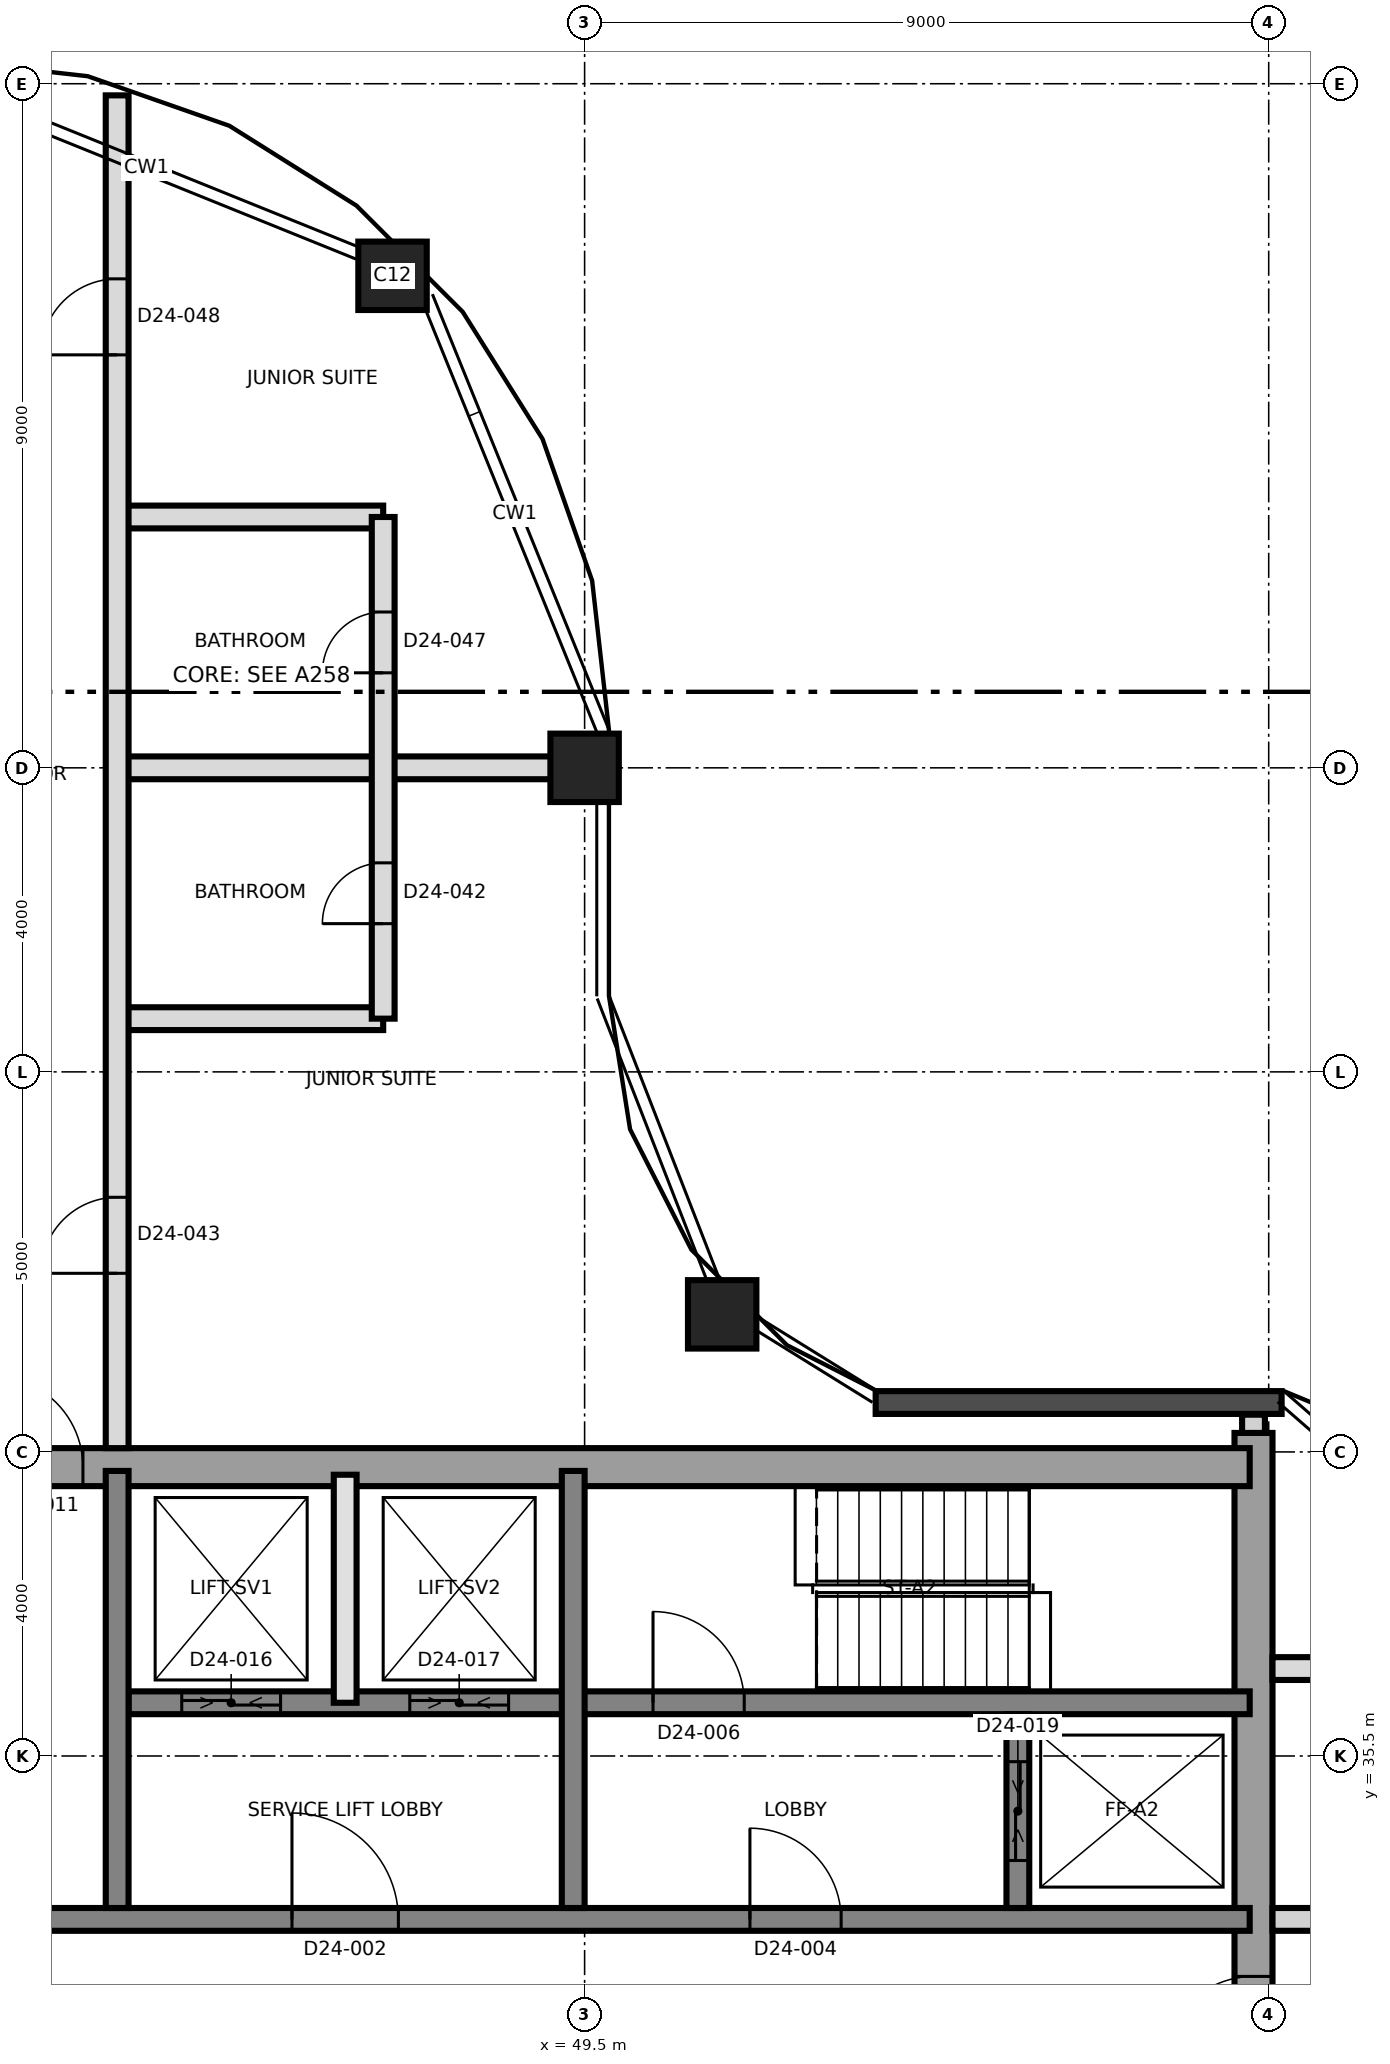
"""IFC4 building model, lengths in metres.
Left out: names, types, materials, properties, quantities, classifications, styles, units other than length and angle.
Written with IfcOpenShell. Run it as: python <this file> out.ifc"""

import sys

from ifc_helpers import new_model, si_unit, direction, frame, frame_2d, origin, origin_2d, place, context, subcontext, project, spatial, rectangle, extrude, element, fill, save


model = new_model("IFC4")
c1 = context("Model", 3, precision=1e-05, world=origin(), true_north=direction((0.0, 1.0)))
c2 = subcontext(c1, "Body", "Model", "MODEL_VIEW")
j1 = project(units=[si_unit("LENGTHUNIT", "METRE"), si_unit("PLANEANGLEUNIT", "RADIAN")], contexts=[c1])
p1 = place(None, origin())
s1 = spatial("IfcSite", under=j1, at=p1, CompositionType="ELEMENT")
p2 = place(p1, origin())
s2 = spatial("IfcBuilding", under=s1, at=p2, CompositionType="ELEMENT")
p3 = place(p2, frame((0.0, 0.0, 221.7)))
s3 = spatial("IfcBuildingStorey", under=s2, at=p3, CompositionType="ELEMENT", Elevation=221.7)
p4 = place(p3, frame((58.3, 21.25, 0.0), z_axis=(0.0, 0.0, 1.0), x_axis=(0.0, 1.0, 0.0)))
e1 = element("IfcWall", 1, at=p4, inside=s3, PredefinedType="SHEAR", context=c2, shape_type="SweptSolid", body=[
    extrude(rectangle(XDim=18.5, YDim=0.5, at=frame_2d((9.25, 0.0))), origin(), (0.0, 0.0, 1.0), 3.7),
])
p5 = place(p4, frame((10.15, 0.0, 0.0)))
e2 = element("IfcOpeningElement", 2, at=p5, cuts=e1, PredefinedType="OPENING", context=c2, shape_type="SweptSolid", body=[
    extrude(rectangle(XDim=1.2, YDim=2.1, at=frame_2d((0.6, 1.05))), frame((0.0, 0.26, 0.0), z_axis=(0.0, -1.0, 0.0), x_axis=(1.0, 0.0, 0.0)), (0.0, 0.0, 1.0), 0.52),
])
p6 = place(p3, frame((31.25, 39.3, 0.0), z_axis=(0.0, 0.0, 1.0), x_axis=(1.0, 0.0, 0.0)))
e3 = element("IfcWall", 3, at=p6, inside=s3, PredefinedType="SHEAR", context=c2, shape_type="SweptSolid", body=[
    extrude(rectangle(XDim=27.0, YDim=0.5, at=frame_2d((13.5, 0.0))), origin(), (0.0, 0.0, 1.0), 3.7),
])
p7 = place(p6, frame((10.45, 0.0, 0.0)))
e4 = element("IfcOpeningElement", 4, at=p7, cuts=e3, PredefinedType="OPENING", context=c2, shape_type="SweptSolid", body=[
    extrude(rectangle(XDim=1.2, YDim=2.1, at=frame_2d((0.6, 1.05))), frame((0.0, 0.26, 0.0), z_axis=(0.0, -1.0, 0.0), x_axis=(1.0, 0.0, 0.0)), (0.0, 0.0, 1.0), 0.52),
])
p8 = place(p3, frame((31.75, 33.35, 0.0), z_axis=(0.0, 0.0, 1.0), x_axis=(1.0, 0.0, 0.0)))
e5 = element("IfcWall", 5, at=p8, inside=s3, PredefinedType="SHEAR", context=c2, shape_type="SweptSolid", body=[
    extrude(rectangle(XDim=26.5, YDim=0.3, at=frame_2d((13.25, 0.0))), origin(), (0.0, 0.0, 1.0), 3.7),
])
p9 = place(p8, frame((13.9, 0.0, 0.0)))
e6 = element("IfcOpeningElement", 6, at=p9, cuts=e5, PredefinedType="OPENING", context=c2, shape_type="SweptSolid", body=[
    extrude(rectangle(XDim=1.4, YDim=2.1, at=frame_2d((0.7, 1.05))), frame((0.0, 0.16, 0.0), z_axis=(0.0, -1.0, 0.0), x_axis=(1.0, 0.0, 0.0)), (0.0, 0.0, 1.0), 0.32),
])
p10 = place(p8, frame((5.375, 0.0, 0.0)))
e7 = element("IfcOpeningElement", 7, at=p10, cuts=e5, PredefinedType="OPENING", context=c2, shape_type="SweptSolid", body=[
    extrude(rectangle(XDim=1.2, YDim=2.1, at=frame_2d((0.6, 1.05))), frame((0.0, 0.16, 0.0), z_axis=(0.0, -1.0, 0.0), x_axis=(1.0, 0.0, 0.0)), (0.0, 0.0, 1.0), 0.32),
])
p11 = place(p8, frame((19.925, 0.0, 0.0)))
e8 = element("IfcOpeningElement", 8, at=p11, cuts=e5, PredefinedType="OPENING", context=c2, shape_type="SweptSolid", body=[
    extrude(rectangle(XDim=1.2, YDim=2.1, at=frame_2d((0.6, 1.05))), frame((0.0, 0.16, 0.0), z_axis=(0.0, -1.0, 0.0), x_axis=(1.0, 0.0, 0.0)), (0.0, 0.0, 1.0), 0.32),
])
p12 = place(p3, frame((43.5, 36.2, 0.0), z_axis=(0.0, 0.0, 1.0), x_axis=(1.0, 0.0, 0.0)))
e9 = element("IfcWall", 9, at=p12, inside=s3, PredefinedType="SHEAR", context=c2, shape_type="SweptSolid", body=[
    extrude(rectangle(XDim=14.75, YDim=0.3, at=frame_2d((7.375, 0.0))), origin(), (0.0, 0.0, 1.0), 3.7),
])
p13 = place(p12, frame((6.9, 0.0, 0.0)))
e10 = element("IfcOpeningElement", 10, at=p13, cuts=e9, PredefinedType="OPENING", context=c2, shape_type="SweptSolid", body=[
    extrude(rectangle(XDim=1.2, YDim=2.1, at=frame_2d((0.6, 1.05))), frame((0.0, 0.16, 0.0), z_axis=(0.0, -1.0, 0.0), x_axis=(1.0, 0.0, 0.0)), (0.0, 0.0, 1.0), 0.32),
])
p14 = place(p12, frame((0.7, 0.0, 0.0)))
e11 = element("IfcOpeningElement", 11, at=p14, cuts=e9, PredefinedType="OPENING", context=c2, shape_type="SweptSolid", body=[
    extrude(rectangle(XDim=1.3, YDim=2.4, at=frame_2d((0.65, 1.2))), frame((0.0, 0.16, 0.0), z_axis=(0.0, -1.0, 0.0), x_axis=(1.0, 0.0, 0.0)), (0.0, 0.0, 1.0), 0.32),
])
p15 = place(p12, frame((3.7, 0.0, 0.0)))
e12 = element("IfcOpeningElement", 12, at=p15, cuts=e9, PredefinedType="OPENING", context=c2, shape_type="SweptSolid", body=[
    extrude(rectangle(XDim=1.3, YDim=2.4, at=frame_2d((0.65, 1.2))), frame((0.0, 0.16, 0.0), z_axis=(0.0, -1.0, 0.0), x_axis=(1.0, 0.0, 0.0)), (0.0, 0.0, 1.0), 0.32),
])
for number, where, z_axis, x_axis in (
    (13, (43.35, 33.5, 0.0), (0.0, 0.0, 1.0), (0.0, 1.0, 0.0)),
    (14, (49.35, 33.5, 0.0), (0.0, 0.0, 1.0), (0.0, 1.0, 0.0)),
):
    element("IfcWall", number, at=place(p3, frame(where, z_axis=z_axis, x_axis=x_axis)), inside=s3, PredefinedType="SHEAR", context=c2, shape_type="SweptSolid", body=[
        extrude(rectangle(XDim=5.75, YDim=0.3, at=frame_2d((2.875, 0.0))), origin(), (0.0, 0.0, 1.0), 3.7),
    ])
p16 = place(p3, frame((55.2, 33.5, 0.0), z_axis=(0.0, 0.0, 1.0), x_axis=(0.0, 1.0, 0.0)))
e15 = element("IfcWall", 15, at=p16, inside=s3, PredefinedType="SHEAR", context=c2, shape_type="SweptSolid", body=[
    extrude(rectangle(XDim=2.55, YDim=0.3, at=frame_2d((1.275, 0.0))), origin(), (0.0, 0.0, 1.0), 3.7),
])
p17 = place(p16, frame((0.625, 0.0, 0.0)))
e16 = element("IfcOpeningElement", 16, at=p17, cuts=e15, PredefinedType="OPENING", context=c2, shape_type="SweptSolid", body=[
    extrude(rectangle(XDim=1.3, YDim=2.4, at=frame_2d((0.65, 1.2))), frame((0.0, 0.16, 0.0), z_axis=(0.0, -1.0, 0.0), x_axis=(1.0, 0.0, 0.0)), (0.0, 0.0, 1.0), 0.32),
])
for number, where, z_axis, x_axis in (
    (17, (51.31, 41.31, 0.0), (0.0, 0.0, 1.0), (1.0, 0.0, 0.0)),
    (18, (49.5, 48.5, 0.0), (0.0, 0.0, 1.0), (1.0, 0.0, 0.0)),
    (19, (46.973, 54.973, 0.0), (0.0, 0.0, 1.0), (1.0, 0.0, 0.0)),
):
    element("IfcColumn", number, at=place(p3, frame(where, z_axis=z_axis, x_axis=x_axis)), inside=s3, PredefinedType="COLUMN", context=c2, shape_type="SweptSolid", body=[
        extrude(rectangle(XDim=0.9, YDim=0.9, at=origin_2d()), origin(), (0.0, 0.0, 1.0), 3.7),
    ])
p18 = place(p3, frame((58.67, 40.15, 0.0), z_axis=(0.0, 0.0, 1.0), x_axis=(-1.0, 0.0, 0.0)))
e20 = element("IfcWall", 20, at=p18, inside=s3, PredefinedType="SOLIDWALL", context=c2, shape_type="SweptSolid", body=[
    extrude(rectangle(XDim=5.341, YDim=0.3, at=frame_2d((2.67, 0.0))), origin(), (0.0, 0.0, 1.0), 3.4),
])
p19 = place(p3, frame((46.35, 36.2, 0.0), z_axis=(0.0, 0.0, 1.0), x_axis=(0.0, 1.0, 0.0)))
e21 = element("IfcWall", 21, at=p19, inside=s3, PredefinedType="SOLIDWALL", context=c2, shape_type="SweptSolid", body=[
    extrude(rectangle(XDim=3.0, YDim=0.3, at=frame_2d((1.5, 0.0))), origin(), (0.0, 0.0, 1.0), 3.4),
])
p20 = place(p3, frame((58.55, 33.35, 0.0), z_axis=(0.0, 0.0, 1.0), x_axis=(1.0, 0.0, 0.0)))
e22 = element("IfcWall", 22, at=p20, inside=s3, PredefinedType="PARTITIONING", context=c2, shape_type="SweptSolid", body=[
    extrude(rectangle(XDim=26.78, YDim=0.3, at=frame_2d((13.39, 0.0))), origin(), (0.0, 0.0, 1.0), 3.4),
])
p21 = place(p20, frame((3.95, 0.0, 0.0)))
e23 = element("IfcOpeningElement", 23, at=p21, cuts=e22, PredefinedType="OPENING", context=c2, shape_type="SweptSolid", body=[
    extrude(rectangle(XDim=1.0, YDim=2.4, at=frame_2d((0.5, 1.2))), frame((0.0, 0.16, 0.0), z_axis=(0.0, -1.0, 0.0), x_axis=(1.0, 0.0, 0.0)), (0.0, 0.0, 1.0), 0.32),
])
p22 = place(p20, frame((12.05, 0.0, 0.0)))
e24 = element("IfcOpeningElement", 24, at=p22, cuts=e22, PredefinedType="OPENING", context=c2, shape_type="SweptSolid", body=[
    extrude(rectangle(XDim=1.0, YDim=2.1, at=frame_2d((0.5, 1.05))), frame((0.0, 0.16, 0.0), z_axis=(0.0, -1.0, 0.0), x_axis=(1.0, 0.0, 0.0)), (0.0, 0.0, 1.0), 0.32),
])
p23 = place(p20, frame((13.85, 0.0, 0.0)))
e25 = element("IfcOpeningElement", 25, at=p23, cuts=e22, PredefinedType="OPENING", context=c2, shape_type="SweptSolid", body=[
    extrude(rectangle(XDim=1.0, YDim=2.1, at=frame_2d((0.5, 1.05))), frame((0.0, 0.16, 0.0), z_axis=(0.0, -1.0, 0.0), x_axis=(1.0, 0.0, 0.0)), (0.0, 0.0, 1.0), 0.32),
])
p24 = place(p20, frame((20.3, 0.0, 0.0)))
e26 = element("IfcOpeningElement", 26, at=p24, cuts=e22, PredefinedType="OPENING", context=c2, shape_type="SweptSolid", body=[
    extrude(rectangle(XDim=1.0, YDim=2.4, at=frame_2d((0.5, 1.2))), frame((0.0, 0.16, 0.0), z_axis=(0.0, -1.0, 0.0), x_axis=(1.0, 0.0, 0.0)), (0.0, 0.0, 1.0), 0.32),
])
p25 = place(p3, frame((58.55, 36.65, 0.0), z_axis=(0.0, 0.0, 1.0), x_axis=(1.0, 0.0, 0.0)))
e27 = element("IfcWall", 27, at=p25, inside=s3, PredefinedType="PARTITIONING", context=c2, shape_type="SweptSolid", body=[
    extrude(rectangle(XDim=2.95, YDim=0.3, at=frame_2d((1.475, 0.0))), origin(), (0.0, 0.0, 1.0), 3.4),
])
p26 = place(p25, frame((1.05, 0.0, 0.0)))
e28 = element("IfcOpeningElement", 28, at=p26, cuts=e27, PredefinedType="OPENING", context=c2, shape_type="SweptSolid", body=[
    extrude(rectangle(XDim=0.8, YDim=2.1, at=frame_2d((0.4, 1.05))), frame((0.0, 0.16, 0.0), z_axis=(0.0, -1.0, 0.0), x_axis=(1.0, 0.0, 0.0)), (0.0, 0.0, 1.0), 0.32),
])
p27 = place(p3, frame((43.35, 45.2, 0.0), z_axis=(0.0, 0.0, 1.0), x_axis=(1.0, 0.0, 0.0)))
e29 = element("IfcWall", 29, at=p27, inside=s3, PredefinedType="PARTITIONING", context=c2, shape_type="SweptSolid", body=[
    extrude(rectangle(XDim=3.5, YDim=0.3, at=frame_2d((1.75, 0.0))), origin(), (0.0, 0.0, 1.0), 3.4),
])
p28 = place(p3, frame((43.35, 48.5, 0.0), z_axis=(0.0, 0.0, 1.0), x_axis=(1.0, 0.0, 0.0)))
e30 = element("IfcWall", 30, at=p28, inside=s3, PredefinedType="PARTITIONING", context=c2, shape_type="SweptSolid", body=[
    extrude(rectangle(XDim=6.12, YDim=0.3, at=frame_2d((3.06, 0.0))), origin(), (0.0, 0.0, 1.0), 3.4),
])
p29 = place(p3, frame((43.35, 51.8, 0.0), z_axis=(0.0, 0.0, 1.0), x_axis=(1.0, 0.0, 0.0)))
e31 = element("IfcWall", 31, at=p29, inside=s3, PredefinedType="PARTITIONING", context=c2, shape_type="SweptSolid", body=[
    extrude(rectangle(XDim=3.5, YDim=0.3, at=frame_2d((1.75, 0.0))), origin(), (0.0, 0.0, 1.0), 3.4),
])
p30 = place(p3, frame((43.35, 39.55, 0.0), z_axis=(0.0, 0.0, 1.0), x_axis=(0.0, 1.0, 0.0)))
e32 = element("IfcWall", 32, at=p30, inside=s3, PredefinedType="PARTITIONING", context=c2, shape_type="SweptSolid", body=[
    extrude(rectangle(XDim=17.797, YDim=0.3, at=frame_2d((8.898, 0.0))), origin(), (0.0, 0.0, 1.0), 3.4),
])
p31 = place(p30, frame((2.3, 0.0, 0.0)))
e33 = element("IfcOpeningElement", 33, at=p31, cuts=e32, PredefinedType="OPENING", context=c2, shape_type="SweptSolid", body=[
    extrude(rectangle(XDim=1.0, YDim=2.4, at=frame_2d((0.5, 1.2))), frame((0.0, 0.16, 0.0), z_axis=(0.0, -1.0, 0.0), x_axis=(1.0, 0.0, 0.0)), (0.0, 0.0, 1.0), 0.32),
])
p32 = place(p30, frame((14.383, 0.0, 0.0)))
e34 = element("IfcOpeningElement", 34, at=p32, cuts=e32, PredefinedType="OPENING", context=c2, shape_type="SweptSolid", body=[
    extrude(rectangle(XDim=1.0, YDim=2.4, at=frame_2d((0.5, 1.2))), frame((0.0, 0.16, 0.0), z_axis=(0.0, -1.0, 0.0), x_axis=(1.0, 0.0, 0.0)), (0.0, 0.0, 1.0), 0.32),
])
p33 = place(p3, frame((46.85, 45.2, 0.0), z_axis=(0.0, 0.0, 1.0), x_axis=(0.0, 1.0, 0.0)))
e35 = element("IfcWall", 35, at=p33, inside=s3, PredefinedType="PARTITIONING", context=c2, shape_type="SweptSolid", body=[
    extrude(rectangle(XDim=6.6, YDim=0.3, at=frame_2d((3.3, 0.0))), origin(), (0.0, 0.0, 1.0), 3.4),
])
p34 = place(p33, frame((1.25, 0.0, 0.0)))
e36 = element("IfcOpeningElement", 36, at=p34, cuts=e35, PredefinedType="OPENING", context=c2, shape_type="SweptSolid", body=[
    extrude(rectangle(XDim=0.8, YDim=2.1, at=frame_2d((0.4, 1.05))), frame((0.0, 0.16, 0.0), z_axis=(0.0, -1.0, 0.0), x_axis=(1.0, 0.0, 0.0)), (0.0, 0.0, 1.0), 0.32),
])
p35 = place(p33, frame((4.55, 0.0, 0.0)))
e37 = element("IfcOpeningElement", 37, at=p35, cuts=e35, PredefinedType="OPENING", context=c2, shape_type="SweptSolid", body=[
    extrude(rectangle(XDim=0.8, YDim=2.1, at=frame_2d((0.4, 1.05))), frame((0.0, 0.16, 0.0), z_axis=(0.0, -1.0, 0.0), x_axis=(1.0, 0.0, 0.0)), (0.0, 0.0, 1.0), 0.32),
])
p36 = place(p3, frame((58.3, 39.75, 0.0), z_axis=(0.0, 0.0, 1.0), x_axis=(0.0, 1.0, 0.0)))
e38 = element("IfcWall", 38, at=p36, inside=s3, PredefinedType="PARTITIONING", context=c2, shape_type="SweptSolid", body=[
    extrude(rectangle(XDim=0.24, YDim=0.3, at=frame_2d((0.12, 0.0))), origin(), (0.0, 0.0, 1.0), 3.4),
])
p37 = place(p9, origin())
e39 = element("IfcDoor", 39, at=p37, inside=s3, OperationType="SINGLE_SWING_RIGHT", PredefinedType="DOOR", context=c2, shape_type="SweptSolid", body=[
    extrude(rectangle(XDim=1.4, YDim=2.1, at=frame_2d((0.7, 1.05))), frame((0.0, 0.025, 0.0), z_axis=(0.0, -1.0, 0.0), x_axis=(1.0, 0.0, 0.0)), (0.0, 0.0, 1.0), 0.05),
])
fill(e6, e39)
p38 = place(p11, origin())
e40 = element("IfcDoor", 40, at=p38, inside=s3, OperationType="SINGLE_SWING_RIGHT", PredefinedType="DOOR", context=c2, shape_type="SweptSolid", body=[
    extrude(rectangle(XDim=1.2, YDim=2.1, at=frame_2d((0.6, 1.05))), frame((0.0, 0.025, 0.0), z_axis=(0.0, -1.0, 0.0), x_axis=(1.0, 0.0, 0.0)), (0.0, 0.0, 1.0), 0.05),
])
fill(e8, e40)
p39 = place(p13, origin())
e41 = element("IfcDoor", 41, at=p39, inside=s3, OperationType="SINGLE_SWING_LEFT", PredefinedType="DOOR", context=c2, shape_type="SweptSolid", body=[
    extrude(rectangle(XDim=1.2, YDim=2.1, at=frame_2d((0.6, 1.05))), frame((0.0, 0.025, 0.0), z_axis=(0.0, -1.0, 0.0), x_axis=(1.0, 0.0, 0.0)), (0.0, 0.0, 1.0), 0.05),
])
fill(e10, e41)
p40 = place(p5, origin())
e42 = element("IfcDoor", 42, at=p40, inside=s3, OperationType="SINGLE_SWING_LEFT", PredefinedType="DOOR", context=c2, shape_type="SweptSolid", body=[
    extrude(rectangle(XDim=1.2, YDim=2.1, at=frame_2d((0.6, 1.05))), frame((0.0, 0.025, 0.0), z_axis=(0.0, -1.0, 0.0), x_axis=(1.0, 0.0, 0.0)), (0.0, 0.0, 1.0), 0.05),
])
fill(e2, e42)
p41 = place(p7, origin())
e43 = element("IfcDoor", 43, at=p41, inside=s3, OperationType="SINGLE_SWING_RIGHT", PredefinedType="DOOR", context=c2, shape_type="SweptSolid", body=[
    extrude(rectangle(XDim=1.2, YDim=2.1, at=frame_2d((0.6, 1.05))), frame((0.0, 0.025, 0.0), z_axis=(0.0, -1.0, 0.0), x_axis=(1.0, 0.0, 0.0)), (0.0, 0.0, 1.0), 0.05),
])
fill(e4, e43)
p42 = place(p14, origin())
e44 = element("IfcDoor", 44, at=p42, inside=s3, OperationType="SLIDING_TO_LEFT", PredefinedType="DOOR", context=c2, shape_type="SweptSolid", body=[
    extrude(rectangle(XDim=1.3, YDim=2.4, at=frame_2d((0.65, 1.2))), frame((0.0, 0.025, 0.0), z_axis=(0.0, -1.0, 0.0), x_axis=(1.0, 0.0, 0.0)), (0.0, 0.0, 1.0), 0.05),
])
fill(e11, e44)
p43 = place(p15, origin())
e45 = element("IfcDoor", 45, at=p43, inside=s3, OperationType="SLIDING_TO_LEFT", PredefinedType="DOOR", context=c2, shape_type="SweptSolid", body=[
    extrude(rectangle(XDim=1.3, YDim=2.4, at=frame_2d((0.65, 1.2))), frame((0.0, 0.025, 0.0), z_axis=(0.0, -1.0, 0.0), x_axis=(1.0, 0.0, 0.0)), (0.0, 0.0, 1.0), 0.05),
])
fill(e12, e45)
p44 = place(p17, origin())
e46 = element("IfcDoor", 46, at=p44, inside=s3, OperationType="SLIDING_TO_LEFT", PredefinedType="DOOR", context=c2, shape_type="SweptSolid", body=[
    extrude(rectangle(XDim=1.3, YDim=2.4, at=frame_2d((0.65, 1.2))), frame((0.0, 0.025, 0.0), z_axis=(0.0, -1.0, 0.0), x_axis=(1.0, 0.0, 0.0)), (0.0, 0.0, 1.0), 0.05),
])
fill(e16, e46)
p45 = place(p34, origin())
e47 = element("IfcDoor", 47, at=p45, inside=s3, OperationType="SINGLE_SWING_LEFT", PredefinedType="DOOR", context=c2, shape_type="SweptSolid", body=[
    extrude(rectangle(XDim=0.8, YDim=2.1, at=frame_2d((0.4, 1.05))), frame((0.0, 0.025, 0.0), z_axis=(0.0, -1.0, 0.0), x_axis=(1.0, 0.0, 0.0)), (0.0, 0.0, 1.0), 0.05),
])
fill(e36, e47)
p46 = place(p31, origin())
e48 = element("IfcDoor", 48, at=p46, inside=s3, OperationType="SINGLE_SWING_RIGHT", PredefinedType="DOOR", context=c2, shape_type="SweptSolid", body=[
    extrude(rectangle(XDim=1.0, YDim=2.4, at=frame_2d((0.5, 1.2))), frame((0.0, 0.025, 0.0), z_axis=(0.0, -1.0, 0.0), x_axis=(1.0, 0.0, 0.0)), (0.0, 0.0, 1.0), 0.05),
])
fill(e33, e48)
p47 = place(p35, origin())
e49 = element("IfcDoor", 49, at=p47, inside=s3, OperationType="SINGLE_SWING_RIGHT", PredefinedType="DOOR", context=c2, shape_type="SweptSolid", body=[
    extrude(rectangle(XDim=0.8, YDim=2.1, at=frame_2d((0.4, 1.05))), frame((0.0, 0.025, 0.0), z_axis=(0.0, -1.0, 0.0), x_axis=(1.0, 0.0, 0.0)), (0.0, 0.0, 1.0), 0.05),
])
fill(e37, e49)
p48 = place(p32, origin())
e50 = element("IfcDoor", 50, at=p48, inside=s3, OperationType="SINGLE_SWING_LEFT", PredefinedType="DOOR", context=c2, shape_type="SweptSolid", body=[
    extrude(rectangle(XDim=1.0, YDim=2.4, at=frame_2d((0.5, 1.2))), frame((0.0, 0.025, 0.0), z_axis=(0.0, -1.0, 0.0), x_axis=(1.0, 0.0, 0.0)), (0.0, 0.0, 1.0), 0.05),
])
fill(e34, e50)
save(model, sys.argv[1])
